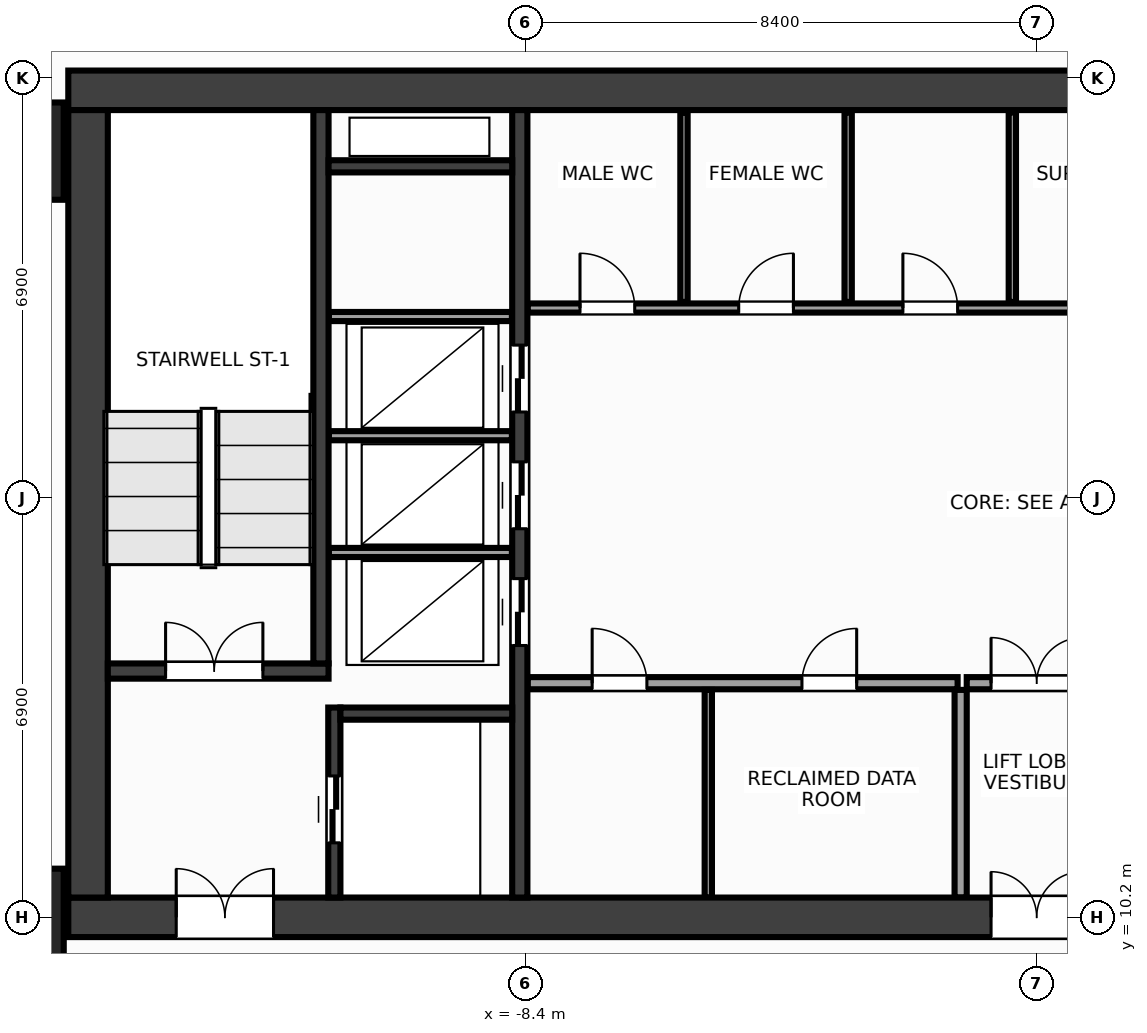
"""IFC4 building model, lengths in metres.
Left out: names, types, materials, properties, quantities, classifications, styles, units other than length and angle.
Written with IfcOpenShell. Run it as: python <this file> out.ifc"""

import sys

from ifc_helpers import new_model, si_unit, direction, frame, frame_2d, origin, origin_2d, place, context, subcontext, project, spatial, rectangle, extrude, source, transform, mapped, element, fill, save


model = new_model("IFC4")
c1 = context("Model", 3, precision=1e-05, world=origin(), true_north=direction((0.0, 1.0)))
c2 = subcontext(c1, "Body", "Model", "MODEL_VIEW")
j1 = project(units=[si_unit("LENGTHUNIT", "METRE"), si_unit("PLANEANGLEUNIT", "RADIAN")], contexts=[c1])
p1 = place(None, origin())
s1 = spatial("IfcSite", under=j1, at=p1, CompositionType="ELEMENT")
p2 = place(p1, origin())
s2 = spatial("IfcBuilding", under=s1, at=p2, CompositionType="ELEMENT")
p3 = place(p2, frame((0.0, 0.0, 135.2)))
s3 = spatial("IfcBuildingStorey", under=s2, at=p3, CompositionType="ELEMENT", Elevation=135.2)
m1 = source(origin(), c2, "Body", "SweptSolid", [
    extrude(rectangle(XDim=31.85, YDim=0.65, at=frame_2d((15.925, 0.0))), origin(), (0.0, 0.0, 1.0), 3.6),
])
p4 = place(p3, frame((-15.925, 23.8, 0.0), z_axis=(0.0, 0.0, 1.0), x_axis=(1.0, 0.0, 0.0)))
e1 = element("IfcWall", 1, at=p4, inside=s3, PredefinedType="SHEAR", context=c2, shape_type="MappedRepresentation", body=[
    mapped(m1, transform((0.0, 0.0, 0.0), x_axis=(1.0, 0.0, 0.0), y_axis=(0.0, 1.0, 0.0), z_axis=(0.0, 0.0, 1.0), scale=1.0)),
])
p5 = place(p3, frame((-15.925, 10.2, 0.0), z_axis=(0.0, 0.0, 1.0), x_axis=(1.0, 0.0, 0.0)))
e2 = element("IfcWall", 2, at=p5, inside=s3, PredefinedType="SHEAR", context=c2, shape_type="MappedRepresentation", body=[
    mapped(m1, transform((0.0, 0.0, 0.0), x_axis=(1.0, 0.0, 0.0), y_axis=(0.0, 1.0, 0.0), z_axis=(0.0, 0.0, 1.0), scale=1.0)),
])
p6 = place(p5, frame((1.775, 0.0, 0.0)))
e3 = element("IfcOpeningElement", 3, at=p6, cuts=e2, PredefinedType="OPENING", context=c2, shape_type="SweptSolid", body=[
    extrude(rectangle(XDim=1.6, YDim=2.15, at=frame_2d((0.8, 1.075))), frame((0.0, 0.337, 0.0), z_axis=(0.0, -1.0, 0.0), x_axis=(1.0, 0.0, 0.0)), (0.0, 0.0, 1.0), 0.674),
])
p7 = place(p5, frame((28.475, 0.0, 0.0)))
e4 = element("IfcOpeningElement", 4, at=p7, cuts=e2, PredefinedType="OPENING", context=c2, shape_type="SweptSolid", body=[
    extrude(rectangle(XDim=1.6, YDim=2.15, at=frame_2d((0.8, 1.075))), frame((0.0, 0.337, 0.0), z_axis=(0.0, -1.0, 0.0), x_axis=(1.0, 0.0, 0.0)), (0.0, 0.0, 1.0), 0.674),
])
p8 = place(p5, frame((15.175, 0.0, 0.0)))
e5 = element("IfcOpeningElement", 5, at=p8, cuts=e2, PredefinedType="OPENING", context=c2, shape_type="SweptSolid", body=[
    extrude(rectangle(XDim=1.5, YDim=2.2, at=frame_2d((0.75, 1.1))), frame((0.0, 0.337, 0.0), z_axis=(0.0, -1.0, 0.0), x_axis=(1.0, 0.0, 0.0)), (0.0, 0.0, 1.0), 0.674),
])
m2 = source(origin(), c2, "Body", "SweptSolid", [
    extrude(rectangle(XDim=12.95, YDim=0.65, at=frame_2d((6.475, 0.0))), origin(), (0.0, 0.0, 1.0), 3.6),
])
p9 = place(p3, frame((-15.6, 10.525, 0.0), z_axis=(0.0, 0.0, 1.0), x_axis=(0.0, 1.0, 0.0)))
e6 = element("IfcWall", 6, at=p9, inside=s3, PredefinedType="SHEAR", context=c2, shape_type="MappedRepresentation", body=[
    mapped(m2, transform((0.0, 0.0, 0.0), x_axis=(1.0, 0.0, 0.0), y_axis=(0.0, 1.0, 0.0), z_axis=(0.0, 0.0, 1.0), scale=1.0)),
])
m3 = source(origin(), c2, "Body", "SweptSolid", [
    extrude(rectangle(XDim=12.95, YDim=0.25, at=frame_2d((6.475, 0.0))), origin(), (0.0, 0.0, 1.0), 3.6),
])
p10 = place(p3, frame((-8.5, 10.525, 0.0), z_axis=(0.0, 0.0, 1.0), x_axis=(0.0, 1.0, 0.0)))
e7 = element("IfcWall", 7, at=p10, inside=s3, PredefinedType="SHEAR", context=c2, shape_type="MappedRepresentation", body=[
    mapped(m3, transform((0.0, 0.0, 0.0), x_axis=(1.0, 0.0, 0.0), y_axis=(0.0, 1.0, 0.0), z_axis=(0.0, 0.0, 1.0), scale=1.0)),
])
p11 = place(p10, frame((4.145, 0.0, 0.0)))
e8 = element("IfcOpeningElement", 8, at=p11, cuts=e7, PredefinedType="OPENING", context=c2, shape_type="SweptSolid", body=[
    extrude(rectangle(XDim=1.1, YDim=2.15, at=frame_2d((0.55, 1.075))), frame((0.0, 0.137, 0.0), z_axis=(0.0, -1.0, 0.0), x_axis=(1.0, 0.0, 0.0)), (0.0, 0.0, 1.0), 0.274),
])
p12 = place(p10, frame((6.065, 0.0, 0.0)))
e9 = element("IfcOpeningElement", 9, at=p12, cuts=e7, PredefinedType="OPENING", context=c2, shape_type="SweptSolid", body=[
    extrude(rectangle(XDim=1.1, YDim=2.15, at=frame_2d((0.55, 1.075))), frame((0.0, 0.137, 0.0), z_axis=(0.0, -1.0, 0.0), x_axis=(1.0, 0.0, 0.0)), (0.0, 0.0, 1.0), 0.274),
])
p13 = place(p10, frame((7.985, 0.0, 0.0)))
e10 = element("IfcOpeningElement", 10, at=p13, cuts=e7, PredefinedType="OPENING", context=c2, shape_type="SweptSolid", body=[
    extrude(rectangle(XDim=1.1, YDim=2.15, at=frame_2d((0.55, 1.075))), frame((0.0, 0.137, 0.0), z_axis=(0.0, -1.0, 0.0), x_axis=(1.0, 0.0, 0.0)), (0.0, 0.0, 1.0), 0.274),
])
m4 = source(origin(), c2, "Body", "SweptSolid", [
    extrude(rectangle(XDim=3.63, YDim=0.25, at=frame_2d((1.815, 0.0))), origin(), (0.0, 0.0, 1.0), 3.6),
])
p14 = place(p3, frame((-15.275, 14.25, 0.0), z_axis=(0.0, 0.0, 1.0), x_axis=(1.0, 0.0, 0.0)))
e11 = element("IfcWall", 11, at=p14, inside=s3, PredefinedType="SHEAR", context=c2, shape_type="MappedRepresentation", body=[
    mapped(m4, transform((0.0, 0.0, 0.0), x_axis=(1.0, 0.0, 0.0), y_axis=(0.0, 1.0, 0.0), z_axis=(0.0, 0.0, 1.0), scale=1.0)),
])
p15 = place(p14, frame((0.95, 0.0, 0.0)))
e12 = element("IfcOpeningElement", 12, at=p15, cuts=e11, PredefinedType="OPENING", context=c2, shape_type="SweptSolid", body=[
    extrude(rectangle(XDim=1.6, YDim=2.15, at=frame_2d((0.8, 1.075))), frame((0.0, 0.137, 0.0), z_axis=(0.0, -1.0, 0.0), x_axis=(1.0, 0.0, 0.0)), (0.0, 0.0, 1.0), 0.274),
])
m5 = source(origin(), c2, "Body", "SweptSolid", [
    extrude(rectangle(XDim=9.1, YDim=0.25, at=frame_2d((4.55, 0.0))), origin(), (0.0, 0.0, 1.0), 3.6),
])
p16 = place(p3, frame((-11.77, 14.375, 0.0), z_axis=(0.0, 0.0, 1.0), x_axis=(0.0, 1.0, 0.0)))
e13 = element("IfcWall", 13, at=p16, inside=s3, PredefinedType="SHEAR", context=c2, shape_type="MappedRepresentation", body=[
    mapped(m5, transform((0.0, 0.0, 0.0), x_axis=(1.0, 0.0, 0.0), y_axis=(0.0, 1.0, 0.0), z_axis=(0.0, 0.0, 1.0), scale=1.0)),
])
m6 = source(origin(), c2, "Body", "SweptSolid", [
    extrude(rectangle(XDim=3.125, YDim=0.2, at=frame_2d((1.562, 0.0))), origin(), (0.0, 0.0, 1.0), 3.6),
])
p17 = place(p3, frame((-11.55, 10.525, 0.0), z_axis=(0.0, 0.0, 1.0), x_axis=(0.0, 1.0, 0.0)))
e14 = element("IfcWall", 14, at=p17, inside=s3, PredefinedType="SHEAR", context=c2, shape_type="MappedRepresentation", body=[
    mapped(m6, transform((0.0, 0.0, 0.0), x_axis=(1.0, 0.0, 0.0), y_axis=(0.0, 1.0, 0.0), z_axis=(0.0, 0.0, 1.0), scale=1.0)),
])
p18 = place(p17, frame((0.9, 0.0, 0.0)))
e15 = element("IfcOpeningElement", 15, at=p18, cuts=e14, PredefinedType="OPENING", context=c2, shape_type="SweptSolid", body=[
    extrude(rectangle(XDim=1.1, YDim=2.15, at=frame_2d((0.55, 1.075))), frame((0.0, 0.112, 0.0), z_axis=(0.0, -1.0, 0.0), x_axis=(1.0, 0.0, 0.0)), (0.0, 0.0, 1.0), 0.224),
])
m7 = source(origin(), c2, "Body", "SweptSolid", [
    extrude(rectangle(XDim=2.825, YDim=0.2, at=frame_2d((1.413, 0.0))), origin(), (0.0, 0.0, 1.0), 3.6),
])
p19 = place(p3, frame((-11.45, 13.55, 0.0), z_axis=(0.0, 0.0, 1.0), x_axis=(1.0, 0.0, 0.0)))
e16 = element("IfcWall", 16, at=p19, inside=s3, PredefinedType="SHEAR", context=c2, shape_type="MappedRepresentation", body=[
    mapped(m7, transform((0.0, 0.0, 0.0), x_axis=(1.0, 0.0, 0.0), y_axis=(0.0, 1.0, 0.0), z_axis=(0.0, 0.0, 1.0), scale=1.0)),
])
m8 = source(origin(), c2, "Body", "SweptSolid", [
    extrude(rectangle(XDim=3.02, YDim=0.2, at=frame_2d((1.51, 0.0))), origin(), (0.0, 0.0, 1.0), 3.6),
])
p20 = place(p3, frame((-11.645, 22.55, 0.0), z_axis=(0.0, 0.0, 1.0), x_axis=(1.0, 0.0, 0.0)))
e17 = element("IfcWall", 17, at=p20, inside=s3, PredefinedType="SHEAR", context=c2, shape_type="MappedRepresentation", body=[
    mapped(m8, transform((0.0, 0.0, 0.0), x_axis=(1.0, 0.0, 0.0), y_axis=(0.0, 1.0, 0.0), z_axis=(0.0, 0.0, 1.0), scale=1.0)),
])
m9 = source(origin(), c2, "Body", "SweptSolid", [
    extrude(rectangle(XDim=1.6, YDim=1.6, at=origin_2d()), origin(), (0.0, 0.0, 1.0), 3.6),
])
for number, where, z_axis, x_axis in (
    (18, (-16.8, 10.2, 0.0), (0.0, 0.0, 1.0), (1.0, 0.0, 0.0)),
    (19, (-16.8, 22.8, 0.0), (0.0, 0.0, 1.0), (1.0, 0.0, 0.0)),
):
    element("IfcColumn", number, at=place(p3, frame(where, z_axis=z_axis, x_axis=x_axis)), inside=s3, PredefinedType="COLUMN", context=c2, shape_type="MappedRepresentation", body=[
        mapped(m9, transform((0.0, 0.0, 0.0), x_axis=(1.0, 0.0, 0.0), y_axis=(0.0, 1.0, 0.0), z_axis=(0.0, 0.0, 1.0), scale=1.0)),
    ])
m10 = source(origin(), c2, "Body", "SweptSolid", [
    extrude(rectangle(XDim=3.01, YDim=0.15, at=frame_2d((1.505, 0.0))), origin(), (0.0, 0.0, 1.0), 3.38),
])
for number, where, z_axis, x_axis in (
    (20, (-11.64, 16.2, 0.0), (0.0, 0.0, 1.0), (1.0, 0.0, 0.0)),
    (21, (-11.64, 18.12, 0.0), (0.0, 0.0, 1.0), (1.0, 0.0, 0.0)),
    (22, (-11.64, 20.08, 0.0), (0.0, 0.0, 1.0), (1.0, 0.0, 0.0)),
):
    element("IfcWall", number, at=place(p3, frame(where, z_axis=z_axis, x_axis=x_axis)), inside=s3, PredefinedType="PARTITIONING", context=c2, shape_type="MappedRepresentation", body=[
        mapped(m10, transform((0.0, 0.0, 0.0), x_axis=(1.0, 0.0, 0.0), y_axis=(0.0, 1.0, 0.0), z_axis=(0.0, 0.0, 1.0), scale=1.0)),
    ])
m11 = source(origin(), c2, "Body", "SweptSolid", [
    extrude(rectangle(XDim=7.07, YDim=0.2, at=frame_2d((3.535, 0.0))), origin(), (0.0, 0.0, 1.0), 3.38),
])
p21 = place(p3, frame((-8.37, 14.05, 0.0), z_axis=(0.0, 0.0, 1.0), x_axis=(1.0, 0.0, 0.0)))
e23 = element("IfcWall", 23, at=p21, inside=s3, PredefinedType="PARTITIONING", context=c2, shape_type="MappedRepresentation", body=[
    mapped(m11, transform((0.0, 0.0, 0.0), x_axis=(1.0, 0.0, 0.0), y_axis=(0.0, 1.0, 0.0), z_axis=(0.0, 0.0, 1.0), scale=1.0)),
])
p22 = place(p21, frame((1.06, 0.0, 0.0)))
e24 = element("IfcOpeningElement", 24, at=p22, cuts=e23, PredefinedType="OPENING", context=c2, shape_type="SweptSolid", body=[
    extrude(rectangle(XDim=0.9, YDim=2.15, at=frame_2d((0.45, 1.075))), frame((0.0, 0.112, 0.0), z_axis=(0.0, -1.0, 0.0), x_axis=(1.0, 0.0, 0.0)), (0.0, 0.0, 1.0), 0.224),
])
p23 = place(p21, frame((4.51, 0.0, 0.0)))
e25 = element("IfcOpeningElement", 25, at=p23, cuts=e23, PredefinedType="OPENING", context=c2, shape_type="SweptSolid", body=[
    extrude(rectangle(XDim=0.9, YDim=2.15, at=frame_2d((0.45, 1.075))), frame((0.0, 0.112, 0.0), z_axis=(0.0, -1.0, 0.0), x_axis=(1.0, 0.0, 0.0)), (0.0, 0.0, 1.0), 0.224),
])
m12 = source(origin(), c2, "Body", "SweptSolid", [
    extrude(rectangle(XDim=3.415, YDim=0.2, at=frame_2d((1.708, 0.0))), origin(), (0.0, 0.0, 1.0), 3.38),
])
p24 = place(p3, frame((-1.25, 10.525, 0.0), z_axis=(0.0, 0.0, 1.0), x_axis=(0.0, 1.0, 0.0)))
e26 = element("IfcWall", 26, at=p24, inside=s3, PredefinedType="PARTITIONING", context=c2, shape_type="MappedRepresentation", body=[
    mapped(m12, transform((0.0, 0.0, 0.0), x_axis=(1.0, 0.0, 0.0), y_axis=(0.0, 1.0, 0.0), z_axis=(0.0, 0.0, 1.0), scale=1.0)),
])
m13 = source(origin(), c2, "Body", "SweptSolid", [
    extrude(rectangle(XDim=2.3, YDim=0.2, at=frame_2d((1.15, 0.0))), origin(), (0.0, 0.0, 1.0), 3.38),
])
p25 = place(p3, frame((-1.15, 14.05, 0.0), z_axis=(0.0, 0.0, 1.0), x_axis=(1.0, 0.0, 0.0)))
e27 = element("IfcWall", 27, at=p25, inside=s3, PredefinedType="PARTITIONING", context=c2, shape_type="MappedRepresentation", body=[
    mapped(m13, transform((0.0, 0.0, 0.0), x_axis=(1.0, 0.0, 0.0), y_axis=(0.0, 1.0, 0.0), z_axis=(0.0, 0.0, 1.0), scale=1.0)),
])
p26 = place(p25, frame((0.4, 0.0, 0.0)))
e28 = element("IfcOpeningElement", 28, at=p26, cuts=e27, PredefinedType="OPENING", context=c2, shape_type="SweptSolid", body=[
    extrude(rectangle(XDim=1.5, YDim=2.2, at=frame_2d((0.75, 1.1))), frame((0.0, 0.112, 0.0), z_axis=(0.0, -1.0, 0.0), x_axis=(1.0, 0.0, 0.0)), (0.0, 0.0, 1.0), 0.224),
])
m14 = source(origin(), c2, "Body", "SweptSolid", [
    extrude(rectangle(XDim=14.59, YDim=0.15, at=frame_2d((7.295, 0.0))), origin(), (0.0, 0.0, 1.0), 3.38),
])
p27 = place(p3, frame((-8.37, 20.22, 0.0), z_axis=(0.0, 0.0, 1.0), x_axis=(1.0, 0.0, 0.0)))
e29 = element("IfcWall", 29, at=p27, inside=s3, PredefinedType="PARTITIONING", context=c2, shape_type="MappedRepresentation", body=[
    mapped(m14, transform((0.0, 0.0, 0.0), x_axis=(1.0, 0.0, 0.0), y_axis=(0.0, 1.0, 0.0), z_axis=(0.0, 0.0, 1.0), scale=1.0)),
])
p28 = place(p27, frame((0.86, 0.0, 0.0)))
e30 = element("IfcOpeningElement", 30, at=p28, cuts=e29, PredefinedType="OPENING", context=c2, shape_type="SweptSolid", body=[
    extrude(rectangle(XDim=0.9, YDim=2.15, at=frame_2d((0.45, 1.075))), frame((0.0, 0.087, 0.0), z_axis=(0.0, -1.0, 0.0), x_axis=(1.0, 0.0, 0.0)), (0.0, 0.0, 1.0), 0.174),
])
p29 = place(p27, frame((3.47, 0.0, 0.0)))
e31 = element("IfcOpeningElement", 31, at=p29, cuts=e29, PredefinedType="OPENING", context=c2, shape_type="SweptSolid", body=[
    extrude(rectangle(XDim=0.9, YDim=2.15, at=frame_2d((0.45, 1.075))), frame((0.0, 0.087, 0.0), z_axis=(0.0, -1.0, 0.0), x_axis=(1.0, 0.0, 0.0)), (0.0, 0.0, 1.0), 0.174),
])
p30 = place(p27, frame((6.17, 0.0, 0.0)))
e32 = element("IfcOpeningElement", 32, at=p30, cuts=e29, PredefinedType="OPENING", context=c2, shape_type="SweptSolid", body=[
    extrude(rectangle(XDim=0.9, YDim=2.15, at=frame_2d((0.45, 1.075))), frame((0.0, 0.087, 0.0), z_axis=(0.0, -1.0, 0.0), x_axis=(1.0, 0.0, 0.0)), (0.0, 0.0, 1.0), 0.174),
])
p31 = place(p27, frame((9.07, 0.0, 0.0)))
e33 = element("IfcOpeningElement", 33, at=p31, cuts=e29, PredefinedType="OPENING", context=c2, shape_type="SweptSolid", body=[
    extrude(rectangle(XDim=0.9, YDim=2.15, at=frame_2d((0.45, 1.075))), frame((0.0, 0.087, 0.0), z_axis=(0.0, -1.0, 0.0), x_axis=(1.0, 0.0, 0.0)), (0.0, 0.0, 1.0), 0.174),
])
p32 = place(p27, frame((12.32, 0.0, 0.0)))
e34 = element("IfcOpeningElement", 34, at=p32, cuts=e29, PredefinedType="OPENING", context=c2, shape_type="SweptSolid", body=[
    extrude(rectangle(XDim=0.9, YDim=2.15, at=frame_2d((0.45, 1.075))), frame((0.0, 0.087, 0.0), z_axis=(0.0, -1.0, 0.0), x_axis=(1.0, 0.0, 0.0)), (0.0, 0.0, 1.0), 0.174),
])
m15 = source(origin(), c2, "Body", "SweptSolid", [
    extrude(rectangle(XDim=3.415, YDim=0.12, at=frame_2d((1.708, 0.0))), origin(), (0.0, 0.0, 1.0), 3.38),
])
p33 = place(p3, frame((-5.4, 10.525, 0.0), z_axis=(0.0, 0.0, 1.0), x_axis=(0.0, 1.0, 0.0)))
e35 = element("IfcWall", 35, at=p33, inside=s3, PredefinedType="PARTITIONING", context=c2, shape_type="MappedRepresentation", body=[
    mapped(m15, transform((0.0, 0.0, 0.0), x_axis=(1.0, 0.0, 0.0), y_axis=(0.0, 1.0, 0.0), z_axis=(0.0, 0.0, 1.0), scale=1.0)),
])
m16 = source(origin(), c2, "Body", "SweptSolid", [
    extrude(rectangle(XDim=3.115, YDim=0.12, at=frame_2d((1.558, 0.0))), origin(), (0.0, 0.0, 1.0), 3.38),
])
for number, where, z_axis, x_axis in (
    (36, (-5.8, 20.32, 0.0), (0.0, 0.0, 1.0), (0.0, 1.0, 0.0)),
    (37, (-3.1, 20.32, 0.0), (0.0, 0.0, 1.0), (0.0, 1.0, 0.0)),
    (38, (-0.4, 20.32, 0.0), (0.0, 0.0, 1.0), (0.0, 1.0, 0.0)),
):
    element("IfcWall", number, at=place(p3, frame(where, z_axis=z_axis, x_axis=x_axis)), inside=s3, PredefinedType="PARTITIONING", context=c2, shape_type="MappedRepresentation", body=[
        mapped(m16, transform((0.0, 0.0, 0.0), x_axis=(1.0, 0.0, 0.0), y_axis=(0.0, 1.0, 0.0), z_axis=(0.0, 0.0, 1.0), scale=1.0)),
    ])
m17 = source(origin(), c2, "Body", "SweptSolid", [
    extrude(rectangle(XDim=1.6, YDim=2.15, at=frame_2d((0.8, 1.075))), frame((0.0, 0.025, 0.0), z_axis=(0.0, -1.0, 0.0), x_axis=(1.0, 0.0, 0.0)), (0.0, 0.0, 1.0), 0.05),
])
p34 = place(p15, origin())
e39 = element("IfcDoor", 39, at=p34, inside=s3, OperationType="DOUBLE_DOOR_SINGLE_SWING", PredefinedType="DOOR", context=c2, shape_type="MappedRepresentation", body=[
    mapped(m17, transform((0.0, 0.0, 0.0), x_axis=(1.0, 0.0, 0.0), y_axis=(0.0, 1.0, 0.0), z_axis=(0.0, 0.0, 1.0), scale=1.0)),
])
fill(e12, e39)
p35 = place(p6, origin())
e40 = element("IfcDoor", 40, at=p35, inside=s3, OperationType="DOUBLE_DOOR_SINGLE_SWING", PredefinedType="DOOR", context=c2, shape_type="MappedRepresentation", body=[
    mapped(m17, transform((0.0, 0.0, 0.0), x_axis=(1.0, 0.0, 0.0), y_axis=(0.0, 1.0, 0.0), z_axis=(0.0, 0.0, 1.0), scale=1.0)),
])
fill(e3, e40)
m18 = source(origin(), c2, "Body", "SweptSolid", [
    extrude(rectangle(XDim=1.1, YDim=2.15, at=frame_2d((0.55, 1.075))), frame((0.0, 0.025, 0.0), z_axis=(0.0, -1.0, 0.0), x_axis=(1.0, 0.0, 0.0)), (0.0, 0.0, 1.0), 0.05),
])
p36 = place(p18, origin())
e41 = element("IfcDoor", 41, at=p36, inside=s3, OperationType="DOUBLE_DOOR_SLIDING", PredefinedType="DOOR", context=c2, shape_type="MappedRepresentation", body=[
    mapped(m18, transform((0.0, 0.0, 0.0), x_axis=(1.0, 0.0, 0.0), y_axis=(0.0, 1.0, 0.0), z_axis=(0.0, 0.0, 1.0), scale=1.0)),
])
fill(e15, e41)
p37 = place(p11, origin())
e42 = element("IfcDoor", 42, at=p37, inside=s3, OperationType="DOUBLE_DOOR_SLIDING", PredefinedType="DOOR", context=c2, shape_type="MappedRepresentation", body=[
    mapped(m18, transform((0.0, 0.0, 0.0), x_axis=(1.0, 0.0, 0.0), y_axis=(0.0, 1.0, 0.0), z_axis=(0.0, 0.0, 1.0), scale=1.0)),
])
fill(e8, e42)
p38 = place(p12, origin())
e43 = element("IfcDoor", 43, at=p38, inside=s3, OperationType="DOUBLE_DOOR_SLIDING", PredefinedType="DOOR", context=c2, shape_type="MappedRepresentation", body=[
    mapped(m18, transform((0.0, 0.0, 0.0), x_axis=(1.0, 0.0, 0.0), y_axis=(0.0, 1.0, 0.0), z_axis=(0.0, 0.0, 1.0), scale=1.0)),
])
fill(e9, e43)
p39 = place(p13, origin())
e44 = element("IfcDoor", 44, at=p39, inside=s3, OperationType="DOUBLE_DOOR_SLIDING", PredefinedType="DOOR", context=c2, shape_type="MappedRepresentation", body=[
    mapped(m18, transform((0.0, 0.0, 0.0), x_axis=(1.0, 0.0, 0.0), y_axis=(0.0, 1.0, 0.0), z_axis=(0.0, 0.0, 1.0), scale=1.0)),
])
fill(e10, e44)
m19 = source(origin(), c2, "Body", "SweptSolid", [
    extrude(rectangle(XDim=0.9, YDim=2.15, at=frame_2d((0.45, 1.075))), frame((0.0, 0.025, 0.0), z_axis=(0.0, -1.0, 0.0), x_axis=(1.0, 0.0, 0.0)), (0.0, 0.0, 1.0), 0.05),
])
p40 = place(p22, origin())
e45 = element("IfcDoor", 45, at=p40, inside=s3, OperationType="SINGLE_SWING_LEFT", PredefinedType="DOOR", context=c2, shape_type="MappedRepresentation", body=[
    mapped(m19, transform((0.0, 0.0, 0.0), x_axis=(1.0, 0.0, 0.0), y_axis=(0.0, 1.0, 0.0), z_axis=(0.0, 0.0, 1.0), scale=1.0)),
])
fill(e24, e45)
p41 = place(p23, origin())
e46 = element("IfcDoor", 46, at=p41, inside=s3, OperationType="SINGLE_SWING_RIGHT", PredefinedType="DOOR", context=c2, shape_type="MappedRepresentation", body=[
    mapped(m19, transform((0.0, 0.0, 0.0), x_axis=(1.0, 0.0, 0.0), y_axis=(0.0, 1.0, 0.0), z_axis=(0.0, 0.0, 1.0), scale=1.0)),
])
fill(e25, e46)
m20 = source(origin(), c2, "Body", "SweptSolid", [
    extrude(rectangle(XDim=1.5, YDim=2.2, at=frame_2d((0.75, 1.1))), frame((0.0, 0.025, 0.0), z_axis=(0.0, -1.0, 0.0), x_axis=(1.0, 0.0, 0.0)), (0.0, 0.0, 1.0), 0.05),
])
p42 = place(p26, origin())
e47 = element("IfcDoor", 47, at=p42, inside=s3, OperationType="DOUBLE_DOOR_SINGLE_SWING", PredefinedType="DOOR", context=c2, shape_type="MappedRepresentation", body=[
    mapped(m20, transform((0.0, 0.0, 0.0), x_axis=(1.0, 0.0, 0.0), y_axis=(0.0, 1.0, 0.0), z_axis=(0.0, 0.0, 1.0), scale=1.0)),
])
fill(e28, e47)
p43 = place(p8, origin())
e48 = element("IfcDoor", 48, at=p43, inside=s3, OperationType="DOUBLE_DOOR_SINGLE_SWING", PredefinedType="DOOR", context=c2, shape_type="MappedRepresentation", body=[
    mapped(m20, transform((0.0, 0.0, 0.0), x_axis=(1.0, 0.0, 0.0), y_axis=(0.0, 1.0, 0.0), z_axis=(0.0, 0.0, 1.0), scale=1.0)),
])
fill(e5, e48)
p44 = place(p28, origin())
e49 = element("IfcDoor", 49, at=p44, inside=s3, OperationType="SINGLE_SWING_LEFT", PredefinedType="DOOR", context=c2, shape_type="MappedRepresentation", body=[
    mapped(m19, transform((0.0, 0.0, 0.0), x_axis=(1.0, 0.0, 0.0), y_axis=(0.0, 1.0, 0.0), z_axis=(0.0, 0.0, 1.0), scale=1.0)),
])
fill(e30, e49)
p45 = place(p29, origin())
e50 = element("IfcDoor", 50, at=p45, inside=s3, OperationType="SINGLE_SWING_RIGHT", PredefinedType="DOOR", context=c2, shape_type="MappedRepresentation", body=[
    mapped(m19, transform((0.0, 0.0, 0.0), x_axis=(1.0, 0.0, 0.0), y_axis=(0.0, 1.0, 0.0), z_axis=(0.0, 0.0, 1.0), scale=1.0)),
])
fill(e31, e50)
p46 = place(p30, origin())
e51 = element("IfcDoor", 51, at=p46, inside=s3, OperationType="SINGLE_SWING_LEFT", PredefinedType="DOOR", context=c2, shape_type="MappedRepresentation", body=[
    mapped(m19, transform((0.0, 0.0, 0.0), x_axis=(1.0, 0.0, 0.0), y_axis=(0.0, 1.0, 0.0), z_axis=(0.0, 0.0, 1.0), scale=1.0)),
])
fill(e32, e51)
save(model, sys.argv[1])
